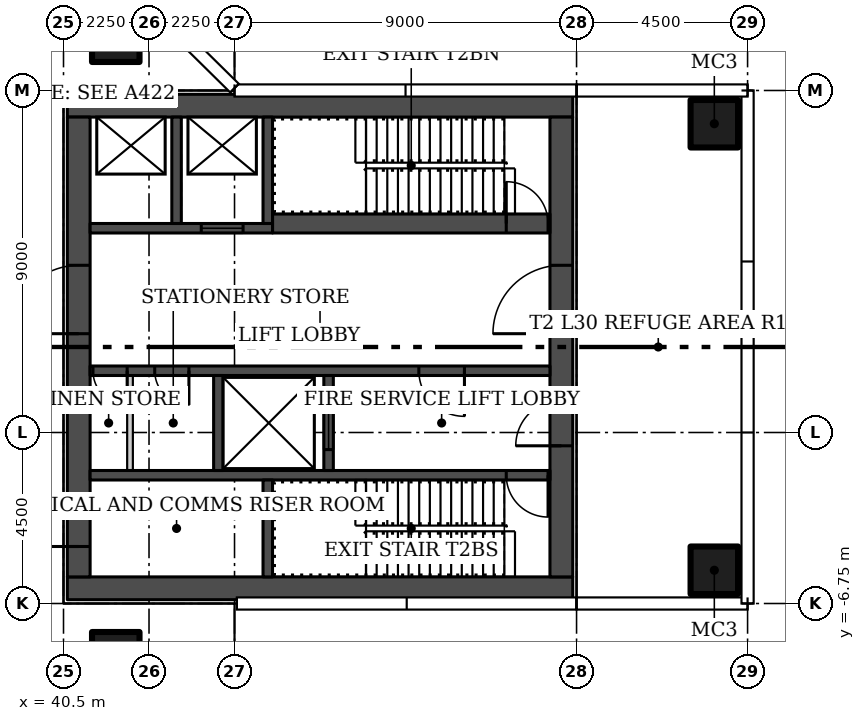
"""IFC4 building model, lengths in metres.
Left out: names, types, materials, properties, quantities, classifications, styles, units other than length and angle.
Written with IfcOpenShell. Run it as: python <this file> out.ifc"""

import sys

from ifc_helpers import new_model, si_unit, direction, frame, frame_2d, origin, origin_2d, place, context, subcontext, project, spatial, rectangle, hollow_rectangle, extrude, element, fill, save


model = new_model("IFC4")
c1 = context("Model", 3, precision=1e-05, world=origin(), true_north=direction((0.0, 1.0)))
c2 = subcontext(c1, "Body", "Model", "MODEL_VIEW")
j1 = project(units=[si_unit("LENGTHUNIT", "METRE"), si_unit("PLANEANGLEUNIT", "RADIAN")], contexts=[c1])
p1 = place(None, origin())
s1 = spatial("IfcSite", under=j1, at=p1, CompositionType="ELEMENT")
p2 = place(p1, origin())
s2 = spatial("IfcBuilding", under=s1, at=p2, CompositionType="ELEMENT")
p3 = place(p2, frame((0.0, 0.0, 128.7)))
s3 = spatial("IfcBuildingStorey", under=s2, at=p3, CompositionType="ELEMENT", Elevation=128.7)
for number, where in (
    (1, (41.875, 8.125, 0.0)),
    (2, (41.875, -8.125, 0.0)),
    (3, (57.625, -5.875, 0.0)),
    (4, (57.625, 5.875, 0.0)),
):
    element("IfcColumn", number, at=place(p3, frame(where)), inside=s3, PredefinedType="COLUMN", context=c2, shape_type="SweptSolid", body=[
        extrude(hollow_rectangle(XDim=1.25, YDim=1.25, WallThickness=0.05, at=origin_2d()), origin(), (0.0, 0.0, 1.0), 4.4),
    ])
p4 = place(p3, frame((40.6, 6.75, 0.0), z_axis=(0.0, 0.0, 1.0), x_axis=(-1.0, 0.0, 0.0)))
e5 = element("IfcWall", 5, at=p4, inside=s3, PredefinedType="PARTITIONING", context=c2, shape_type="SweptSolid", body=[
    extrude(rectangle(XDim=13.7, YDim=0.2, at=frame_2d((6.85, 0.0))), origin(), (0.0, 0.0, 1.0), 4.4),
])
p5 = place(p4, frame((6.1, 0.0, 0.0)))
e6 = element("IfcOpeningElement", 6, at=p5, cuts=e5, PredefinedType="OPENING", context=c2, shape_type="SweptSolid", body=[
    extrude(rectangle(XDim=1.5, YDim=2.4, at=frame_2d((0.75, 1.2))), frame((0.0, 0.11, 0.0), z_axis=(0.0, -1.0, 0.0), x_axis=(1.0, 0.0, 0.0)), (0.0, 0.0, 1.0), 0.22),
])
for number, where, z_axis, x_axis in (
    (7, (53.9, -6.35, 0.0), (0.0, 0.0, 1.0), (-1.0, 0.0, 0.0)),
    (8, (53.9, 6.35, 0.0), (0.0, 0.0, 1.0), (-1.0, 0.0, 0.0)),
):
    element("IfcWall", number, at=place(p3, frame(where, z_axis=z_axis, x_axis=x_axis)), inside=s3, PredefinedType="SHEAR", context=c2, shape_type="SweptSolid", body=[
        extrude(rectangle(XDim=13.3, YDim=0.6, at=frame_2d((6.65, 0.0))), origin(), (0.0, 0.0, 1.0), 4.4),
    ])
p6 = place(p3, frame((53.6, -6.05, 0.0), z_axis=(0.0, 0.0, 1.0), x_axis=(0.0, 1.0, 0.0)))
e9 = element("IfcWall", 9, at=p6, inside=s3, PredefinedType="SHEAR", context=c2, shape_type="SweptSolid", body=[
    extrude(rectangle(XDim=12.1, YDim=0.6, at=frame_2d((6.05, 0.0))), origin(), (0.0, 0.0, 1.0), 4.4),
])
p7 = place(p6, frame((3.45, 0.0, 0.0)))
e10 = element("IfcOpeningElement", 10, at=p7, cuts=e9, PredefinedType="OPENING", context=c2, shape_type="SweptSolid", body=[
    extrude(rectangle(XDim=1.2, YDim=2.1, at=frame_2d((0.6, 1.05))), frame((0.0, 0.31, 0.0), z_axis=(0.0, -1.0, 0.0), x_axis=(1.0, 0.0, 0.0)), (0.0, 0.0, 1.0), 0.62),
])
p8 = place(p6, frame((6.4, 0.0, 0.0)))
e11 = element("IfcOpeningElement", 11, at=p8, cuts=e9, PredefinedType="OPENING", context=c2, shape_type="SweptSolid", body=[
    extrude(rectangle(XDim=1.8, YDim=2.4, at=frame_2d((0.9, 1.2))), frame((0.0, 0.31, 0.0), z_axis=(0.0, -1.0, 0.0), x_axis=(1.0, 0.0, 0.0)), (0.0, 0.0, 1.0), 0.62),
])
p9 = place(p3, frame((40.9, -6.05, 0.0), z_axis=(0.0, 0.0, 1.0), x_axis=(0.0, 1.0, 0.0)))
e12 = element("IfcWall", 12, at=p9, inside=s3, PredefinedType="SHEAR", context=c2, shape_type="SweptSolid", body=[
    extrude(rectangle(XDim=12.1, YDim=0.6, at=frame_2d((6.05, 0.0))), origin(), (0.0, 0.0, 1.0), 4.4),
])
p10 = place(p9, frame((0.8, 0.0, 0.0)))
e13 = element("IfcOpeningElement", 13, at=p10, cuts=e12, PredefinedType="OPENING", context=c2, shape_type="SweptSolid", body=[
    extrude(rectangle(XDim=1.2, YDim=2.1, at=frame_2d((0.6, 1.05))), frame((0.0, 0.31, 0.0), z_axis=(0.0, -1.0, 0.0), x_axis=(1.0, 0.0, 0.0)), (0.0, 0.0, 1.0), 0.62),
])
p11 = place(p9, frame((6.4, 0.0, 0.0)))
e14 = element("IfcOpeningElement", 14, at=p11, cuts=e12, PredefinedType="OPENING", context=c2, shape_type="SweptSolid", body=[
    extrude(rectangle(XDim=1.8, YDim=2.4, at=frame_2d((0.9, 1.2))), frame((0.0, 0.31, 0.0), z_axis=(0.0, -1.0, 0.0), x_axis=(1.0, 0.0, 0.0)), (0.0, 0.0, 1.0), 0.62),
])
p12 = place(p3, frame((53.3, -3.375, 0.0), z_axis=(0.0, 0.0, 1.0), x_axis=(-1.0, 0.0, 0.0)))
e15 = element("IfcWall", 15, at=p12, inside=s3, PredefinedType="SHEAR", context=c2, shape_type="SweptSolid", body=[
    extrude(rectangle(XDim=12.1, YDim=0.25, at=frame_2d((6.05, 0.0))), origin(), (0.0, 0.0, 1.0), 4.4),
])
p13 = place(p12, frame((0.05, 0.0, 0.0)))
e16 = element("IfcOpeningElement", 16, at=p13, cuts=e15, PredefinedType="OPENING", context=c2, shape_type="SweptSolid", body=[
    extrude(rectangle(XDim=1.1, YDim=2.1, at=frame_2d((0.55, 1.05))), frame((0.0, 0.135, 0.0), z_axis=(0.0, -1.0, 0.0), x_axis=(1.0, 0.0, 0.0)), (0.0, 0.0, 1.0), 0.27),
])
p14 = place(p3, frame((45.875, -6.05, 0.0), z_axis=(0.0, 0.0, 1.0), x_axis=(0.0, 1.0, 0.0)))
e17 = element("IfcWall", 17, at=p14, inside=s3, PredefinedType="SHEAR", context=c2, shape_type="SweptSolid", body=[
    extrude(rectangle(XDim=2.55, YDim=0.25, at=frame_2d((1.275, 0.0))), origin(), (0.0, 0.0, 1.0), 4.4),
])
p15 = place(p3, frame((53.3, -0.625, 0.0), z_axis=(0.0, 0.0, 1.0), x_axis=(-1.0, 0.0, 0.0)))
e18 = element("IfcWall", 18, at=p15, inside=s3, PredefinedType="SHEAR", context=c2, shape_type="SweptSolid", body=[
    extrude(rectangle(XDim=12.1, YDim=0.25, at=frame_2d((6.05, 0.0))), origin(), (0.0, 0.0, 1.0), 4.4),
])
p16 = place(p15, frame((2.25, 0.0, 0.0)))
e19 = element("IfcOpeningElement", 19, at=p16, cuts=e18, PredefinedType="OPENING", context=c2, shape_type="SweptSolid", body=[
    extrude(rectangle(XDim=1.2, YDim=2.1, at=frame_2d((0.6, 1.05))), frame((0.0, 0.135, 0.0), z_axis=(0.0, -1.0, 0.0), x_axis=(1.0, 0.0, 0.0)), (0.0, 0.0, 1.0), 0.27),
])
p17 = place(p15, frame((9.5, 0.0, 0.0)))
e20 = element("IfcOpeningElement", 20, at=p17, cuts=e18, PredefinedType="OPENING", context=c2, shape_type="SweptSolid", body=[
    extrude(rectangle(XDim=0.9, YDim=2.1, at=frame_2d((0.45, 1.05))), frame((0.0, 0.135, 0.0), z_axis=(0.0, -1.0, 0.0), x_axis=(1.0, 0.0, 0.0)), (0.0, 0.0, 1.0), 0.27),
])
p18 = place(p15, frame((11.125, 0.0, 0.0)))
e21 = element("IfcOpeningElement", 21, at=p18, cuts=e18, PredefinedType="OPENING", context=c2, shape_type="SweptSolid", body=[
    extrude(rectangle(XDim=0.9, YDim=2.1, at=frame_2d((0.45, 1.05))), frame((0.0, 0.135, 0.0), z_axis=(0.0, -1.0, 0.0), x_axis=(1.0, 0.0, 0.0)), (0.0, 0.0, 1.0), 0.27),
])
p19 = place(p3, frame((47.475, -3.25, 0.0), z_axis=(0.0, 0.0, 1.0), x_axis=(0.0, 1.0, 0.0)))
e22 = element("IfcWall", 22, at=p19, inside=s3, PredefinedType="SHEAR", context=c2, shape_type="SweptSolid", body=[
    extrude(rectangle(XDim=2.5, YDim=0.25, at=frame_2d((1.25, 0.0))), origin(), (0.0, 0.0, 1.0), 4.4),
])
p20 = place(p19, frame((0.55, 0.0, 0.0)))
e23 = element("IfcOpeningElement", 23, at=p20, cuts=e22, PredefinedType="OPENING", context=c2, shape_type="SweptSolid", body=[
    extrude(rectangle(XDim=1.4, YDim=2.4, at=frame_2d((0.7, 1.2))), frame((0.0, 0.135, 0.0), z_axis=(0.0, -1.0, 0.0), x_axis=(1.0, 0.0, 0.0)), (0.0, 0.0, 1.0), 0.27),
])
p21 = place(p3, frame((44.575, -3.25, 0.0), z_axis=(0.0, 0.0, 1.0), x_axis=(0.0, 1.0, 0.0)))
e24 = element("IfcWall", 24, at=p21, inside=s3, PredefinedType="SHEAR", context=c2, shape_type="SweptSolid", body=[
    extrude(rectangle(XDim=2.5, YDim=0.25, at=frame_2d((1.25, 0.0))), origin(), (0.0, 0.0, 1.0), 4.4),
])
p22 = place(p3, frame((42.25, -3.25, 0.0), z_axis=(0.0, 0.0, 1.0), x_axis=(0.0, 1.0, 0.0)))
e25 = element("IfcWall", 25, at=p22, inside=s3, PredefinedType="PARTITIONING", context=c2, shape_type="SweptSolid", body=[
    extrude(rectangle(XDim=2.5, YDim=0.15, at=frame_2d((1.25, 0.0))), origin(), (0.0, 0.0, 1.0), 4.4),
])
p23 = place(p3, frame((46.0, 3.25, 0.0)))
e26 = element("IfcWall", 26, at=p23, inside=s3, PredefinedType="SHEAR", context=c2, shape_type="SweptSolid", body=[
    extrude(rectangle(XDim=7.3, YDim=0.5, at=frame_2d((3.65, 0.0))), origin(), (0.0, 0.0, 1.0), 4.4),
])
p24 = place(p23, frame((6.15, 0.0, 0.0)))
e27 = element("IfcOpeningElement", 27, at=p24, cuts=e26, PredefinedType="OPENING", context=c2, shape_type="SweptSolid", body=[
    extrude(rectangle(XDim=1.1, YDim=2.1, at=frame_2d((0.55, 1.05))), frame((0.0, 0.26, 0.0), z_axis=(0.0, -1.0, 0.0), x_axis=(1.0, 0.0, 0.0)), (0.0, 0.0, 1.0), 0.52),
])
p25 = place(p3, frame((46.0, 3.125, 0.0), z_axis=(0.0, 0.0, 1.0), x_axis=(-1.0, 0.0, 0.0)))
e28 = element("IfcWall", 28, at=p25, inside=s3, PredefinedType="SHEAR", context=c2, shape_type="SweptSolid", body=[
    extrude(rectangle(XDim=4.8, YDim=0.25, at=frame_2d((2.4, 0.0))), origin(), (0.0, 0.0, 1.0), 4.4),
])
p26 = place(p25, frame((0.775, 0.0, 0.0)))
e29 = element("IfcOpeningElement", 29, at=p26, cuts=e28, PredefinedType="OPENING", context=c2, shape_type="SweptSolid", body=[
    extrude(rectangle(XDim=1.1, YDim=2.1, at=frame_2d((0.55, 1.05))), frame((0.0, 0.135, 0.0), z_axis=(0.0, -1.0, 0.0), x_axis=(1.0, 0.0, 0.0)), (0.0, 0.0, 1.0), 0.27),
])
for number, where, z_axis, x_axis in (
    (30, (45.875, 3.25, 0.0), (0.0, 0.0, 1.0), (0.0, 1.0, 0.0)),
    (31, (43.475, 3.25, 0.0), (0.0, 0.0, 1.0), (0.0, 1.0, 0.0)),
):
    element("IfcWall", number, at=place(p3, frame(where, z_axis=z_axis, x_axis=x_axis)), inside=s3, PredefinedType="SHEAR", context=c2, shape_type="SweptSolid", body=[
        extrude(rectangle(XDim=2.8, YDim=0.25, at=frame_2d((1.4, 0.0))), origin(), (0.0, 0.0, 1.0), 4.4),
    ])
p27 = place(p7, origin())
e32 = element("IfcDoor", 32, at=p27, inside=s3, OperationType="SINGLE_SWING_LEFT", PredefinedType="DOOR", context=c2, shape_type="SweptSolid", body=[
    extrude(rectangle(XDim=1.2, YDim=2.1, at=frame_2d((0.6, 1.05))), frame((0.0, 0.025, 0.0), z_axis=(0.0, -1.0, 0.0), x_axis=(1.0, 0.0, 0.0)), (0.0, 0.0, 1.0), 0.05),
])
fill(e10, e32)
p28 = place(p8, origin())
e33 = element("IfcDoor", 33, at=p28, inside=s3, OperationType="DOUBLE_DOOR_SINGLE_SWING", PredefinedType="DOOR", context=c2, shape_type="SweptSolid", body=[
    extrude(rectangle(XDim=1.8, YDim=2.4, at=frame_2d((0.9, 1.2))), frame((0.0, 0.025, 0.0), z_axis=(0.0, -1.0, 0.0), x_axis=(1.0, 0.0, 0.0)), (0.0, 0.0, 1.0), 0.05),
])
fill(e11, e33)
p29 = place(p10, origin())
e34 = element("IfcDoor", 34, at=p29, inside=s3, OperationType="SINGLE_SWING_LEFT", PredefinedType="DOOR", context=c2, shape_type="SweptSolid", body=[
    extrude(rectangle(XDim=1.2, YDim=2.1, at=frame_2d((0.6, 1.05))), frame((0.0, 0.025, 0.0), z_axis=(0.0, -1.0, 0.0), x_axis=(1.0, 0.0, 0.0)), (0.0, 0.0, 1.0), 0.05),
])
fill(e13, e34)
p30 = place(p11, origin())
e35 = element("IfcDoor", 35, at=p30, inside=s3, OperationType="DOUBLE_DOOR_SINGLE_SWING", PredefinedType="DOOR", context=c2, shape_type="SweptSolid", body=[
    extrude(rectangle(XDim=1.8, YDim=2.4, at=frame_2d((0.9, 1.2))), frame((0.0, 0.025, 0.0), z_axis=(0.0, -1.0, 0.0), x_axis=(1.0, 0.0, 0.0)), (0.0, 0.0, 1.0), 0.05),
])
fill(e14, e35)
p31 = place(p13, origin())
e36 = element("IfcDoor", 36, at=p31, inside=s3, OperationType="SINGLE_SWING_LEFT", PredefinedType="DOOR", context=c2, shape_type="SweptSolid", body=[
    extrude(rectangle(XDim=1.1, YDim=2.1, at=frame_2d((0.55, 1.05))), frame((0.0, 0.025, 0.0), z_axis=(0.0, -1.0, 0.0), x_axis=(1.0, 0.0, 0.0)), (0.0, 0.0, 1.0), 0.05),
])
fill(e16, e36)
p32 = place(p16, origin())
e37 = element("IfcDoor", 37, at=p32, inside=s3, OperationType="SINGLE_SWING_LEFT", PredefinedType="DOOR", context=c2, shape_type="SweptSolid", body=[
    extrude(rectangle(XDim=1.2, YDim=2.1, at=frame_2d((0.6, 1.05))), frame((0.0, 0.025, 0.0), z_axis=(0.0, -1.0, 0.0), x_axis=(1.0, 0.0, 0.0)), (0.0, 0.0, 1.0), 0.05),
])
fill(e19, e37)
p33 = place(p17, origin())
e38 = element("IfcDoor", 38, at=p33, inside=s3, OperationType="SINGLE_SWING_RIGHT", PredefinedType="DOOR", context=c2, shape_type="SweptSolid", body=[
    extrude(rectangle(XDim=0.9, YDim=2.1, at=frame_2d((0.45, 1.05))), frame((0.0, 0.025, 0.0), z_axis=(0.0, -1.0, 0.0), x_axis=(1.0, 0.0, 0.0)), (0.0, 0.0, 1.0), 0.05),
])
fill(e20, e38)
p34 = place(p18, origin())
e39 = element("IfcDoor", 39, at=p34, inside=s3, OperationType="SINGLE_SWING_RIGHT", PredefinedType="DOOR", context=c2, shape_type="SweptSolid", body=[
    extrude(rectangle(XDim=0.9, YDim=2.1, at=frame_2d((0.45, 1.05))), frame((0.0, 0.025, 0.0), z_axis=(0.0, -1.0, 0.0), x_axis=(1.0, 0.0, 0.0)), (0.0, 0.0, 1.0), 0.05),
])
fill(e21, e39)
p35 = place(p20, origin())
e40 = element("IfcDoor", 40, at=p35, inside=s3, OperationType="SLIDING_TO_LEFT", PredefinedType="DOOR", context=c2, shape_type="SweptSolid", body=[
    extrude(rectangle(XDim=1.4, YDim=2.4, at=frame_2d((0.7, 1.2))), frame((0.0, 0.025, 0.0), z_axis=(0.0, -1.0, 0.0), x_axis=(1.0, 0.0, 0.0)), (0.0, 0.0, 1.0), 0.05),
])
fill(e23, e40)
p36 = place(p24, origin())
e41 = element("IfcDoor", 41, at=p36, inside=s3, OperationType="SINGLE_SWING_RIGHT", PredefinedType="DOOR", context=c2, shape_type="SweptSolid", body=[
    extrude(rectangle(XDim=1.1, YDim=2.1, at=frame_2d((0.55, 1.05))), frame((0.0, 0.025, 0.0), z_axis=(0.0, -1.0, 0.0), x_axis=(1.0, 0.0, 0.0)), (0.0, 0.0, 1.0), 0.05),
])
fill(e27, e41)
p37 = place(p26, origin())
e42 = element("IfcDoor", 42, at=p37, inside=s3, OperationType="SLIDING_TO_LEFT", PredefinedType="DOOR", context=c2, shape_type="SweptSolid", body=[
    extrude(rectangle(XDim=1.1, YDim=2.1, at=frame_2d((0.55, 1.05))), frame((0.0, 0.025, 0.0), z_axis=(0.0, -1.0, 0.0), x_axis=(1.0, 0.0, 0.0)), (0.0, 0.0, 1.0), 0.05),
])
fill(e29, e42)
save(model, sys.argv[1])
